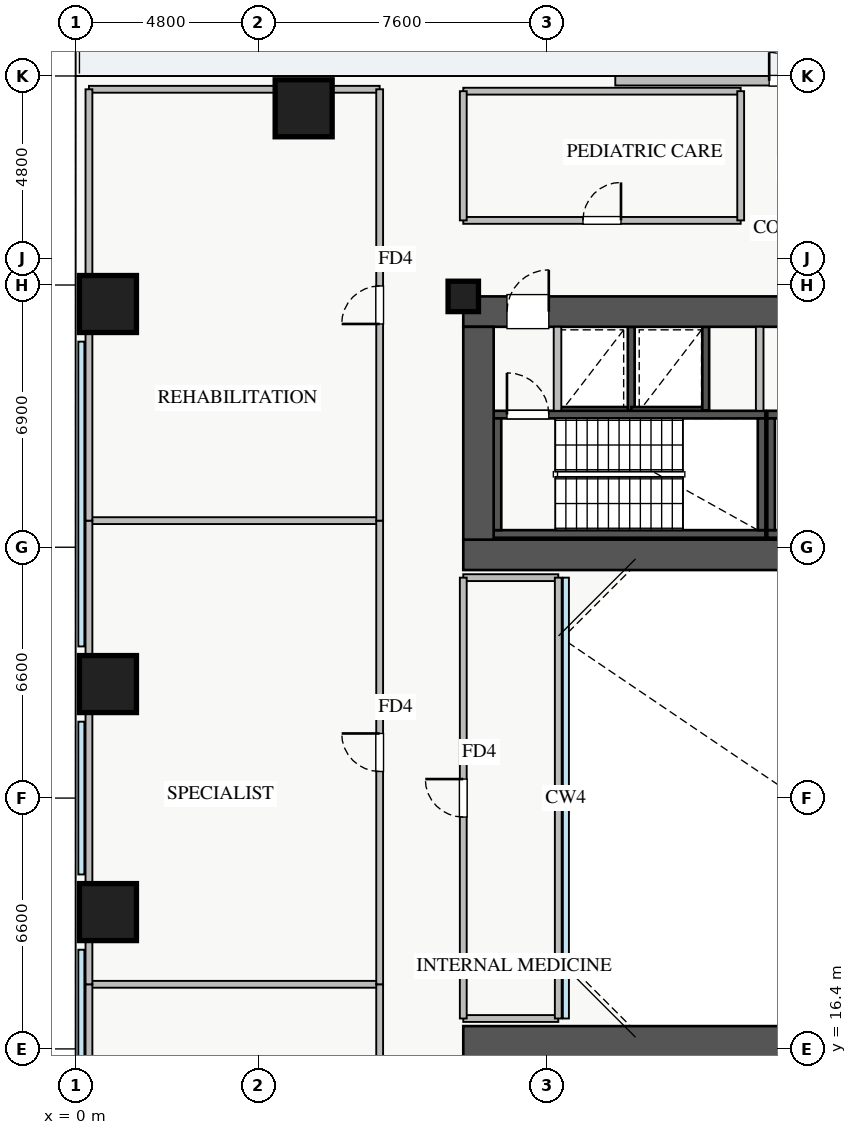
"""IFC4 building model, lengths in metres.
Left out: names, types, materials, properties, quantities, classifications, styles, units other than length and angle.
Written with IfcOpenShell. Run it as: python <this file> out.ifc"""

import sys

from ifc_helpers import new_model, si_unit, direction, frame, frame_2d, origin, origin_2d, place, context, subcontext, project, spatial, rectangle, extrude, source, transform, mapped, element, fill, save


model = new_model("IFC4")
c1 = context("Model", 3, precision=1e-05, world=origin(), true_north=direction((0.0, 1.0)))
c2 = subcontext(c1, "Body", "Model", "MODEL_VIEW")
j1 = project(units=[si_unit("LENGTHUNIT", "METRE"), si_unit("PLANEANGLEUNIT", "RADIAN")], contexts=[c1])
p1 = place(None, origin())
s1 = spatial("IfcSite", under=j1, at=p1, CompositionType="ELEMENT")
p2 = place(p1, origin())
s2 = spatial("IfcBuilding", under=s1, at=p2, CompositionType="ELEMENT")
p3 = place(p2, frame((0.0, 0.0, 9.4)))
s3 = spatial("IfcBuildingStorey", under=s2, at=p3, CompositionType="ELEMENT", Elevation=9.4)
p4 = place(p3, frame((12.68, 33.2, 0.0), z_axis=(0.0, 0.0, 1.0), x_axis=(1.0, 0.0, 0.0)))
e1 = element("IfcWall", 1, at=p4, inside=s3, PredefinedType="SHEAR", context=c2, shape_type="SweptSolid", body=[
    extrude(rectangle(XDim=1.94, YDim=0.18, at=frame_2d((0.97, 0.0))), origin(), (0.0, 0.0, 1.0), 4.18),
])
p5 = place(p3, frame((14.62, 33.2, 0.0), z_axis=(0.0, 0.0, 1.0), x_axis=(0.0, 1.0, 0.0)))
e2 = element("IfcWall", 2, at=p5, inside=s3, PredefinedType="SHEAR", context=c2, shape_type="SweptSolid", body=[
    extrude(rectangle(XDim=2.2, YDim=0.18, at=frame_2d((1.1, 0.0))), origin(), (0.0, 0.0, 1.0), 4.18),
])
p6 = place(p3, frame((14.62, 33.2, 0.0), z_axis=(0.0, 0.0, 1.0), x_axis=(1.0, 0.0, 0.0)))
e3 = element("IfcWall", 3, at=p6, inside=s3, PredefinedType="SHEAR", context=c2, shape_type="SweptSolid", body=[
    extrude(rectangle(XDim=1.96, YDim=0.18, at=frame_2d((0.98, 0.0))), origin(), (0.0, 0.0, 1.0), 4.18),
])
p7 = place(p3, frame((16.58, 33.2, 0.0), z_axis=(0.0, 0.0, 1.0), x_axis=(0.0, 1.0, 0.0)))
e4 = element("IfcWall", 4, at=p7, inside=s3, PredefinedType="SHEAR", context=c2, shape_type="SweptSolid", body=[
    extrude(rectangle(XDim=2.2, YDim=0.18, at=frame_2d((1.1, 0.0))), origin(), (0.0, 0.0, 1.0), 4.18),
])
p8 = place(p3, frame((11.0, 29.95, 0.0), z_axis=(0.0, 0.0, 1.0), x_axis=(1.0, 0.0, 0.0)))
e5 = element("IfcWall", 5, at=p8, inside=s3, PredefinedType="SHEAR", context=c2, shape_type="SweptSolid", body=[
    extrude(rectangle(XDim=7.15, YDim=0.2, at=frame_2d((3.575, 0.0))), origin(), (0.0, 0.0, 1.0), 4.4),
])
p9 = place(p3, frame((11.0, 33.09, 0.0), z_axis=(0.0, 0.0, 1.0), x_axis=(1.0, 0.0, 0.0)))
e6 = element("IfcWall", 6, at=p9, inside=s3, PredefinedType="SHEAR", context=c2, shape_type="SweptSolid", body=[
    extrude(rectangle(XDim=7.15, YDim=0.2, at=frame_2d((3.575, 0.0))), origin(), (0.0, 0.0, 1.0), 4.4),
])
p10 = place(p9, frame((0.35, 0.0, 0.0)))
e7 = element("IfcOpeningElement", 7, at=p10, cuts=e6, PredefinedType="OPENING", context=c2, shape_type="SweptSolid", body=[
    extrude(rectangle(XDim=1.1, YDim=2.05, at=frame_2d((0.55, 1.025))), frame((0.0, 0.11, 0.0), z_axis=(0.0, -1.0, 0.0), x_axis=(1.0, 0.0, 0.0)), (0.0, 0.0, 1.0), 0.22),
])
for number, where, z_axis, x_axis in (
    (8, (11.1, 30.05, 0.0), (0.0, 0.0, 1.0), (0.0, 1.0, 0.0)),
    (9, (18.05, 30.05, 0.0), (0.0, 0.0, 1.0), (0.0, 1.0, 0.0)),
):
    element("IfcWall", number, at=place(p3, frame(where, z_axis=z_axis, x_axis=x_axis)), inside=s3, PredefinedType="SHEAR", context=c2, shape_type="SweptSolid", body=[
        extrude(rectangle(XDim=2.94, YDim=0.2, at=frame_2d((1.47, 0.0))), origin(), (0.0, 0.0, 1.0), 4.4),
    ])
p11 = place(p3, frame((18.2, 29.95, 0.0), z_axis=(0.0, 0.0, 1.0), x_axis=(1.0, 0.0, 0.0)))
e10 = element("IfcWall", 10, at=p11, inside=s3, PredefinedType="SHEAR", context=c2, shape_type="SweptSolid", body=[
    extrude(rectangle(XDim=7.15, YDim=0.2, at=frame_2d((3.575, 0.0))), origin(), (0.0, 0.0, 1.0), 4.4),
])
p12 = place(p3, frame((18.2, 33.09, 0.0), z_axis=(0.0, 0.0, 1.0), x_axis=(1.0, 0.0, 0.0)))
e11 = element("IfcWall", 11, at=p12, inside=s3, PredefinedType="SHEAR", context=c2, shape_type="SweptSolid", body=[
    extrude(rectangle(XDim=7.15, YDim=0.2, at=frame_2d((3.575, 0.0))), origin(), (0.0, 0.0, 1.0), 4.4),
])
p13 = place(p12, frame((0.35, 0.0, 0.0)))
e12 = element("IfcOpeningElement", 12, at=p13, cuts=e11, PredefinedType="OPENING", context=c2, shape_type="SweptSolid", body=[
    extrude(rectangle(XDim=1.1, YDim=2.05, at=frame_2d((0.55, 1.025))), frame((0.0, 0.11, 0.0), z_axis=(0.0, -1.0, 0.0), x_axis=(1.0, 0.0, 0.0)), (0.0, 0.0, 1.0), 0.22),
])
p14 = place(p3, frame((18.3, 30.05, 0.0), z_axis=(0.0, 0.0, 1.0), x_axis=(0.0, 1.0, 0.0)))
e13 = element("IfcWall", 13, at=p14, inside=s3, PredefinedType="SHEAR", context=c2, shape_type="SweptSolid", body=[
    extrude(rectangle(XDim=2.94, YDim=0.2, at=frame_2d((1.47, 0.0))), origin(), (0.0, 0.0, 1.0), 4.4),
])
p15 = place(p3, frame((10.2, 29.4, 0.0), z_axis=(0.0, 0.0, 1.0), x_axis=(1.0, 0.0, 0.0)))
e14 = element("IfcWall", 14, at=p15, inside=s3, PredefinedType="SHEAR", context=c2, shape_type="SweptSolid", body=[
    extrude(rectangle(XDim=17.6, YDim=0.8, at=frame_2d((8.8, 0.0))), origin(), (0.0, 0.0, 1.0), 4.4),
])
p16 = place(p3, frame((10.2, 35.8, 0.0), z_axis=(0.0, 0.0, 1.0), x_axis=(1.0, 0.0, 0.0)))
e15 = element("IfcWall", 15, at=p16, inside=s3, PredefinedType="SHEAR", context=c2, shape_type="SweptSolid", body=[
    extrude(rectangle(XDim=17.6, YDim=0.8, at=frame_2d((8.8, 0.0))), origin(), (0.0, 0.0, 1.0), 4.4),
])
p17 = place(p16, frame((1.15, 0.0, 0.0)))
e16 = element("IfcOpeningElement", 16, at=p17, cuts=e15, PredefinedType="OPENING", context=c2, shape_type="SweptSolid", body=[
    extrude(rectangle(XDim=1.1, YDim=2.05, at=frame_2d((0.55, 1.025))), frame((0.0, 0.41, 0.0), z_axis=(0.0, -1.0, 0.0), x_axis=(1.0, 0.0, 0.0)), (0.0, 0.0, 1.0), 0.82),
])
p18 = place(p16, frame((8.3, 0.0, 0.0)))
e17 = element("IfcOpeningElement", 17, at=p18, cuts=e15, PredefinedType="OPENING", context=c2, shape_type="SweptSolid", body=[
    extrude(rectangle(XDim=1.1, YDim=2.05, at=frame_2d((0.55, 1.025))), frame((0.0, 0.41, 0.0), z_axis=(0.0, -1.0, 0.0), x_axis=(1.0, 0.0, 0.0)), (0.0, 0.0, 1.0), 0.82),
])
p19 = place(p16, frame((10.05, 0.0, 0.0)))
e18 = element("IfcOpeningElement", 18, at=p19, cuts=e15, PredefinedType="OPENING", context=c2, shape_type="SweptSolid", body=[
    extrude(rectangle(XDim=1.1, YDim=2.05, at=frame_2d((0.55, 1.025))), frame((0.0, 0.41, 0.0), z_axis=(0.0, -1.0, 0.0), x_axis=(1.0, 0.0, 0.0)), (0.0, 0.0, 1.0), 0.82),
])
p20 = place(p16, frame((14.74, 0.0, 0.0)))
e19 = element("IfcOpeningElement", 19, at=p20, cuts=e15, PredefinedType="OPENING", context=c2, shape_type="SweptSolid", body=[
    extrude(rectangle(XDim=1.0, YDim=2.05, at=frame_2d((0.5, 1.025))), frame((0.0, 0.41, 0.0), z_axis=(0.0, -1.0, 0.0), x_axis=(1.0, 0.0, 0.0)), (0.0, 0.0, 1.0), 0.82),
])
p21 = place(p16, frame((11.95, 0.0, 0.0)))
e20 = element("IfcOpeningElement", 20, at=p21, cuts=e15, PredefinedType="OPENING", context=c2, shape_type="SweptSolid", body=[
    extrude(rectangle(XDim=1.0, YDim=2.05, at=frame_2d((0.5, 1.025))), frame((0.0, 0.41, 0.0), z_axis=(0.0, -1.0, 0.0), x_axis=(1.0, 0.0, 0.0)), (0.0, 0.0, 1.0), 0.82),
])
p22 = place(p16, frame((13.485, 0.0, 0.0)))
e21 = element("IfcOpeningElement", 21, at=p22, cuts=e15, PredefinedType="OPENING", context=c2, shape_type="SweptSolid", body=[
    extrude(rectangle(XDim=1.0, YDim=2.05, at=frame_2d((0.5, 1.025))), frame((0.0, 0.41, 0.0), z_axis=(0.0, -1.0, 0.0), x_axis=(1.0, 0.0, 0.0)), (0.0, 0.0, 1.0), 0.82),
])
p23 = place(p3, frame((10.6, 29.8, 0.0), z_axis=(0.0, 0.0, 1.0), x_axis=(0.0, 1.0, 0.0)))
e22 = element("IfcWall", 22, at=p23, inside=s3, PredefinedType="SHEAR", context=c2, shape_type="SweptSolid", body=[
    extrude(rectangle(XDim=5.6, YDim=0.8, at=frame_2d((2.8, 0.0))), origin(), (0.0, 0.0, 1.0), 4.4),
])
p24 = place(p3, frame((10.2, 16.6, 0.0), z_axis=(0.0, 0.0, 1.0), x_axis=(1.0, 0.0, 0.0)))
e23 = element("IfcWall", 23, at=p24, inside=s3, PredefinedType="SHEAR", context=c2, shape_type="SweptSolid", body=[
    extrude(rectangle(XDim=17.6, YDim=0.8, at=frame_2d((8.8, 0.0))), origin(), (0.0, 0.0, 1.0), 4.4),
])
m1 = source(origin(), c2, "Body", "SweptSolid", [
    extrude(rectangle(XDim=1.5, YDim=1.5, at=origin_2d()), origin(), (0.0, 0.0, 1.0), 4.4),
])
for number, where, z_axis, x_axis in (
    (24, (6.0, 41.15, 0.0), (0.0, 0.0, 1.0), (1.0, 0.0, 0.0)),
    (25, (0.85, 36.0, 0.0), (0.0, 0.0, 1.0), (1.0, 0.0, 0.0)),
    (26, (0.85, 26.0, 0.0), (0.0, 0.0, 1.0), (1.0, 0.0, 0.0)),
    (27, (0.85, 20.0, 0.0), (0.0, 0.0, 1.0), (1.0, 0.0, 0.0)),
):
    element("IfcColumn", number, at=place(p3, frame(where, z_axis=z_axis, x_axis=x_axis)), inside=s3, PredefinedType="COLUMN", context=c2, shape_type="MappedRepresentation", body=[
        mapped(m1, transform((0.0, 0.0, 0.0), x_axis=(1.0, 0.0, 0.0), y_axis=(0.0, 1.0, 0.0), z_axis=(0.0, 0.0, 1.0), scale=1.0)),
    ])
m2 = source(origin(), c2, "Body", "SweptSolid", [
    extrude(rectangle(XDim=0.8, YDim=0.8, at=origin_2d()), origin(), (0.0, 0.0, 1.0), 4.4),
])
p25 = place(p3, frame((10.2, 36.2, 0.0), z_axis=(0.0, 0.0, 1.0), x_axis=(1.0, 0.0, 0.0)))
e28 = element("IfcColumn", 28, at=p25, inside=s3, PredefinedType="PILASTER", context=c2, shape_type="MappedRepresentation", body=[
    mapped(m2, transform((0.0, 0.0, 0.0), x_axis=(1.0, 0.0, 0.0), y_axis=(0.0, 1.0, 0.0), z_axis=(0.0, 0.0, 1.0), scale=1.0)),
])
p26 = place(p3, frame((14.2, 41.875, 0.0), z_axis=(0.0, 0.0, 1.0), x_axis=(1.0, 0.0, 0.0)))
e29 = element("IfcWall", 29, at=p26, inside=s3, PredefinedType="STANDARD", context=c2, shape_type="SweptSolid", body=[
    extrude(rectangle(XDim=9.6, YDim=0.25, at=frame_2d((4.8, 0.0))), origin(), (0.0, 0.0, 1.0), 3.72),
])
p27 = place(p26, frame((4.05, 0.0, 0.0)))
e30 = element("IfcOpeningElement", 30, at=p27, cuts=e29, PredefinedType="OPENING", context=c2, shape_type="SweptSolid", body=[
    extrude(rectangle(XDim=1.5, YDim=2.15, at=frame_2d((0.75, 1.075))), frame((0.0, 0.135, 0.0), z_axis=(0.0, -1.0, 0.0), x_axis=(1.0, 0.0, 0.0)), (0.0, 0.0, 1.0), 0.27),
])
for number, where, z_axis, x_axis in (
    (31, (12.68, 33.19, 0.0), (0.0, 0.0, 1.0), (0.0, 1.0, 0.0)),
    (32, (18.0, 33.19, 0.0), (0.0, 0.0, 1.0), (0.0, 1.0, 0.0)),
):
    element("IfcWall", number, at=place(p3, frame(where, z_axis=z_axis, x_axis=x_axis)), inside=s3, PredefinedType="PARTITIONING", context=c2, shape_type="SweptSolid", body=[
        extrude(rectangle(XDim=2.21, YDim=0.2, at=frame_2d((1.105, 0.0))), origin(), (0.0, 0.0, 1.0), 4.18),
    ])
p28 = place(p3, frame((0.35, 18.1, 0.0), z_axis=(0.0, 0.0, 1.0), x_axis=(1.0, 0.0, 0.0)))
e33 = element("IfcWall", 33, at=p28, inside=s3, PredefinedType="PARTITIONING", context=c2, shape_type="SweptSolid", body=[
    extrude(rectangle(XDim=7.65, YDim=0.18, at=frame_2d((3.825, 0.0))), origin(), (0.0, 0.0, 1.0), 4.18),
])
p29 = place(p3, frame((0.35, 4.35, 0.0), z_axis=(0.0, 0.0, 1.0), x_axis=(0.0, 1.0, 0.0)))
e34 = element("IfcWall", 34, at=p29, inside=s3, PredefinedType="PARTITIONING", context=c2, shape_type="SweptSolid", body=[
    extrude(rectangle(XDim=13.75, YDim=0.18, at=frame_2d((6.875, 0.0))), origin(), (0.0, 0.0, 1.0), 4.18),
])
p30 = place(p3, frame((8.0, 4.35, 0.0), z_axis=(0.0, 0.0, 1.0), x_axis=(0.0, 1.0, 0.0)))
e35 = element("IfcWall", 35, at=p30, inside=s3, PredefinedType="PARTITIONING", context=c2, shape_type="SweptSolid", body=[
    extrude(rectangle(XDim=13.75, YDim=0.18, at=frame_2d((6.875, 0.0))), origin(), (0.0, 0.0, 1.0), 4.18),
])
p31 = place(p30, frame((6.375, 0.0, 0.0)))
e36 = element("IfcOpeningElement", 36, at=p31, cuts=e35, PredefinedType="OPENING", context=c2, shape_type="SweptSolid", body=[
    extrude(rectangle(XDim=1.0, YDim=2.05, at=frame_2d((0.5, 1.025))), frame((0.0, 0.1, 0.0), z_axis=(0.0, -1.0, 0.0), x_axis=(1.0, 0.0, 0.0)), (0.0, 0.0, 1.0), 0.2),
])
p32 = place(p3, frame((0.35, 30.3, 0.0), z_axis=(0.0, 0.0, 1.0), x_axis=(1.0, 0.0, 0.0)))
e37 = element("IfcWall", 37, at=p32, inside=s3, PredefinedType="PARTITIONING", context=c2, shape_type="SweptSolid", body=[
    extrude(rectangle(XDim=7.65, YDim=0.18, at=frame_2d((3.825, 0.0))), origin(), (0.0, 0.0, 1.0), 4.18),
])
p33 = place(p3, frame((0.35, 18.1, 0.0), z_axis=(0.0, 0.0, 1.0), x_axis=(0.0, 1.0, 0.0)))
e38 = element("IfcWall", 38, at=p33, inside=s3, PredefinedType="PARTITIONING", context=c2, shape_type="SweptSolid", body=[
    extrude(rectangle(XDim=12.2, YDim=0.18, at=frame_2d((6.1, 0.0))), origin(), (0.0, 0.0, 1.0), 4.18),
])
p34 = place(p3, frame((8.0, 18.1, 0.0), z_axis=(0.0, 0.0, 1.0), x_axis=(0.0, 1.0, 0.0)))
e39 = element("IfcWall", 39, at=p34, inside=s3, PredefinedType="PARTITIONING", context=c2, shape_type="SweptSolid", body=[
    extrude(rectangle(XDim=12.2, YDim=0.18, at=frame_2d((6.1, 0.0))), origin(), (0.0, 0.0, 1.0), 4.18),
])
p35 = place(p34, frame((5.6, 0.0, 0.0)))
e40 = element("IfcOpeningElement", 40, at=p35, cuts=e39, PredefinedType="OPENING", context=c2, shape_type="SweptSolid", body=[
    extrude(rectangle(XDim=1.0, YDim=2.05, at=frame_2d((0.5, 1.025))), frame((0.0, 0.1, 0.0), z_axis=(0.0, -1.0, 0.0), x_axis=(1.0, 0.0, 0.0)), (0.0, 0.0, 1.0), 0.2),
])
p36 = place(p3, frame((0.35, 41.65, 0.0), z_axis=(0.0, 0.0, 1.0), x_axis=(1.0, 0.0, 0.0)))
e41 = element("IfcWall", 41, at=p36, inside=s3, PredefinedType="PARTITIONING", context=c2, shape_type="SweptSolid", body=[
    extrude(rectangle(XDim=7.65, YDim=0.18, at=frame_2d((3.825, 0.0))), origin(), (0.0, 0.0, 1.0), 4.18),
])
p37 = place(p3, frame((0.35, 30.3, 0.0), z_axis=(0.0, 0.0, 1.0), x_axis=(0.0, 1.0, 0.0)))
e42 = element("IfcWall", 42, at=p37, inside=s3, PredefinedType="PARTITIONING", context=c2, shape_type="SweptSolid", body=[
    extrude(rectangle(XDim=11.35, YDim=0.18, at=frame_2d((5.675, 0.0))), origin(), (0.0, 0.0, 1.0), 4.18),
])
p38 = place(p3, frame((8.0, 30.3, 0.0), z_axis=(0.0, 0.0, 1.0), x_axis=(0.0, 1.0, 0.0)))
e43 = element("IfcWall", 43, at=p38, inside=s3, PredefinedType="PARTITIONING", context=c2, shape_type="SweptSolid", body=[
    extrude(rectangle(XDim=11.35, YDim=0.18, at=frame_2d((5.675, 0.0))), origin(), (0.0, 0.0, 1.0), 4.18),
])
p39 = place(p38, frame((5.175, 0.0, 0.0)))
e44 = element("IfcOpeningElement", 44, at=p39, cuts=e43, PredefinedType="OPENING", context=c2, shape_type="SweptSolid", body=[
    extrude(rectangle(XDim=1.0, YDim=2.05, at=frame_2d((0.5, 1.025))), frame((0.0, 0.1, 0.0), z_axis=(0.0, -1.0, 0.0), x_axis=(1.0, 0.0, 0.0)), (0.0, 0.0, 1.0), 0.2),
])
for number, where, z_axis, x_axis in (
    (45, (10.2, 17.2, 0.0), (0.0, 0.0, 1.0), (1.0, 0.0, 0.0)),
    (46, (10.2, 28.8, 0.0), (0.0, 0.0, 1.0), (1.0, 0.0, 0.0)),
):
    element("IfcWall", number, at=place(p3, frame(where, z_axis=z_axis, x_axis=x_axis)), inside=s3, PredefinedType="PARTITIONING", context=c2, shape_type="SweptSolid", body=[
        extrude(rectangle(XDim=2.5, YDim=0.18, at=frame_2d((1.25, 0.0))), origin(), (0.0, 0.0, 1.0), 4.18),
    ])
p40 = place(p3, frame((10.2, 17.2, 0.0), z_axis=(0.0, 0.0, 1.0), x_axis=(0.0, 1.0, 0.0)))
e47 = element("IfcWall", 47, at=p40, inside=s3, PredefinedType="PARTITIONING", context=c2, shape_type="SweptSolid", body=[
    extrude(rectangle(XDim=11.6, YDim=0.18, at=frame_2d((5.8, 0.0))), origin(), (0.0, 0.0, 1.0), 4.18),
])
p41 = place(p40, frame((5.3, 0.0, 0.0)))
e48 = element("IfcOpeningElement", 48, at=p41, cuts=e47, PredefinedType="OPENING", context=c2, shape_type="SweptSolid", body=[
    extrude(rectangle(XDim=1.0, YDim=2.05, at=frame_2d((0.5, 1.025))), frame((0.0, 0.1, 0.0), z_axis=(0.0, -1.0, 0.0), x_axis=(1.0, 0.0, 0.0)), (0.0, 0.0, 1.0), 0.2),
])
p42 = place(p3, frame((12.7, 17.2, 0.0), z_axis=(0.0, 0.0, 1.0), x_axis=(0.0, 1.0, 0.0)))
e49 = element("IfcWall", 49, at=p42, inside=s3, PredefinedType="PARTITIONING", context=c2, shape_type="SweptSolid", body=[
    extrude(rectangle(XDim=11.6, YDim=0.18, at=frame_2d((5.8, 0.0))), origin(), (0.0, 0.0, 1.0), 4.18),
])
p43 = place(p3, frame((10.2, 38.2, 0.0), z_axis=(0.0, 0.0, 1.0), x_axis=(1.0, 0.0, 0.0)))
e50 = element("IfcWall", 50, at=p43, inside=s3, PredefinedType="PARTITIONING", context=c2, shape_type="SweptSolid", body=[
    extrude(rectangle(XDim=7.3, YDim=0.18, at=frame_2d((3.65, 0.0))), origin(), (0.0, 0.0, 1.0), 4.18),
])
p44 = place(p43, frame((3.15, 0.0, 0.0)))
e51 = element("IfcOpeningElement", 51, at=p44, cuts=e50, PredefinedType="OPENING", context=c2, shape_type="SweptSolid", body=[
    extrude(rectangle(XDim=1.0, YDim=2.05, at=frame_2d((0.5, 1.025))), frame((0.0, 0.1, 0.0), z_axis=(0.0, -1.0, 0.0), x_axis=(1.0, 0.0, 0.0)), (0.0, 0.0, 1.0), 0.2),
])
p45 = place(p3, frame((10.2, 41.6, 0.0), z_axis=(0.0, 0.0, 1.0), x_axis=(1.0, 0.0, 0.0)))
e52 = element("IfcWall", 52, at=p45, inside=s3, PredefinedType="PARTITIONING", context=c2, shape_type="SweptSolid", body=[
    extrude(rectangle(XDim=7.3, YDim=0.18, at=frame_2d((3.65, 0.0))), origin(), (0.0, 0.0, 1.0), 4.18),
])
for number, where, z_axis, x_axis in (
    (53, (10.2, 38.2, 0.0), (0.0, 0.0, 1.0), (0.0, 1.0, 0.0)),
    (54, (17.5, 38.2, 0.0), (0.0, 0.0, 1.0), (0.0, 1.0, 0.0)),
):
    element("IfcWall", number, at=place(p3, frame(where, z_axis=z_axis, x_axis=x_axis)), inside=s3, PredefinedType="PARTITIONING", context=c2, shape_type="SweptSolid", body=[
        extrude(rectangle(XDim=3.4, YDim=0.18, at=frame_2d((1.7, 0.0))), origin(), (0.0, 0.0, 1.0), 4.18),
    ])
m3 = source(origin(), c2, "Body", "SweptSolid", [
    extrude(rectangle(XDim=1.5, YDim=2.15, at=frame_2d((0.75, 1.075))), frame((0.0, 0.025, 0.0), z_axis=(0.0, -1.0, 0.0), x_axis=(1.0, 0.0, 0.0)), (0.0, 0.0, 1.0), 0.05),
])
p46 = place(p27, origin())
e55 = element("IfcDoor", 55, at=p46, inside=s3, OperationType="DOUBLE_DOOR_SINGLE_SWING", PredefinedType="DOOR", context=c2, shape_type="MappedRepresentation", body=[
    mapped(m3, transform((0.0, 0.0, 0.0), x_axis=(1.0, 0.0, 0.0), y_axis=(0.0, 1.0, 0.0), z_axis=(0.0, 0.0, 1.0), scale=1.0)),
])
fill(e30, e55)
m4 = source(origin(), c2, "Body", "SweptSolid", [
    extrude(rectangle(XDim=1.1, YDim=2.05, at=frame_2d((0.55, 1.025))), frame((0.0, 0.025, 0.0), z_axis=(0.0, -1.0, 0.0), x_axis=(1.0, 0.0, 0.0)), (0.0, 0.0, 1.0), 0.05),
])
p47 = place(p17, origin())
e56 = element("IfcDoor", 56, at=p47, inside=s3, OperationType="SINGLE_SWING_RIGHT", PredefinedType="DOOR", context=c2, shape_type="MappedRepresentation", body=[
    mapped(m4, transform((0.0, 0.0, 0.0), x_axis=(1.0, 0.0, 0.0), y_axis=(0.0, 1.0, 0.0), z_axis=(0.0, 0.0, 1.0), scale=1.0)),
])
fill(e16, e56)
p48 = place(p10, origin())
e57 = element("IfcDoor", 57, at=p48, inside=s3, OperationType="SINGLE_SWING_LEFT", PredefinedType="DOOR", context=c2, shape_type="MappedRepresentation", body=[
    mapped(m4, transform((0.0, 0.0, 0.0), x_axis=(1.0, 0.0, 0.0), y_axis=(0.0, 1.0, 0.0), z_axis=(0.0, 0.0, 1.0), scale=1.0)),
])
fill(e7, e57)
m5 = source(origin(), c2, "Body", "SweptSolid", [
    extrude(rectangle(XDim=1.0, YDim=2.05, at=frame_2d((0.5, 1.025))), frame((0.0, 0.025, 0.0), z_axis=(0.0, -1.0, 0.0), x_axis=(1.0, 0.0, 0.0)), (0.0, 0.0, 1.0), 0.05),
])
p49 = place(p35, origin())
e58 = element("IfcDoor", 58, at=p49, inside=s3, OperationType="SINGLE_SWING_RIGHT", PredefinedType="DOOR", context=c2, shape_type="MappedRepresentation", body=[
    mapped(m5, transform((0.0, 0.0, 0.0), x_axis=(1.0, 0.0, 0.0), y_axis=(0.0, 1.0, 0.0), z_axis=(0.0, 0.0, 1.0), scale=1.0)),
])
fill(e40, e58)
p50 = place(p39, origin())
e59 = element("IfcDoor", 59, at=p50, inside=s3, OperationType="SINGLE_SWING_LEFT", PredefinedType="DOOR", context=c2, shape_type="MappedRepresentation", body=[
    mapped(m5, transform((0.0, 0.0, 0.0), x_axis=(1.0, 0.0, 0.0), y_axis=(0.0, 1.0, 0.0), z_axis=(0.0, 0.0, 1.0), scale=1.0)),
])
fill(e44, e59)
p51 = place(p41, origin())
e60 = element("IfcDoor", 60, at=p51, inside=s3, OperationType="SINGLE_SWING_RIGHT", PredefinedType="DOOR", context=c2, shape_type="MappedRepresentation", body=[
    mapped(m5, transform((0.0, 0.0, 0.0), x_axis=(1.0, 0.0, 0.0), y_axis=(0.0, 1.0, 0.0), z_axis=(0.0, 0.0, 1.0), scale=1.0)),
])
fill(e48, e60)
p52 = place(p44, origin())
e61 = element("IfcDoor", 61, at=p52, inside=s3, OperationType="SINGLE_SWING_RIGHT", PredefinedType="DOOR", context=c2, shape_type="MappedRepresentation", body=[
    mapped(m5, transform((0.0, 0.0, 0.0), x_axis=(1.0, 0.0, 0.0), y_axis=(0.0, 1.0, 0.0), z_axis=(0.0, 0.0, 1.0), scale=1.0)),
])
fill(e51, e61)
save(model, sys.argv[1])
